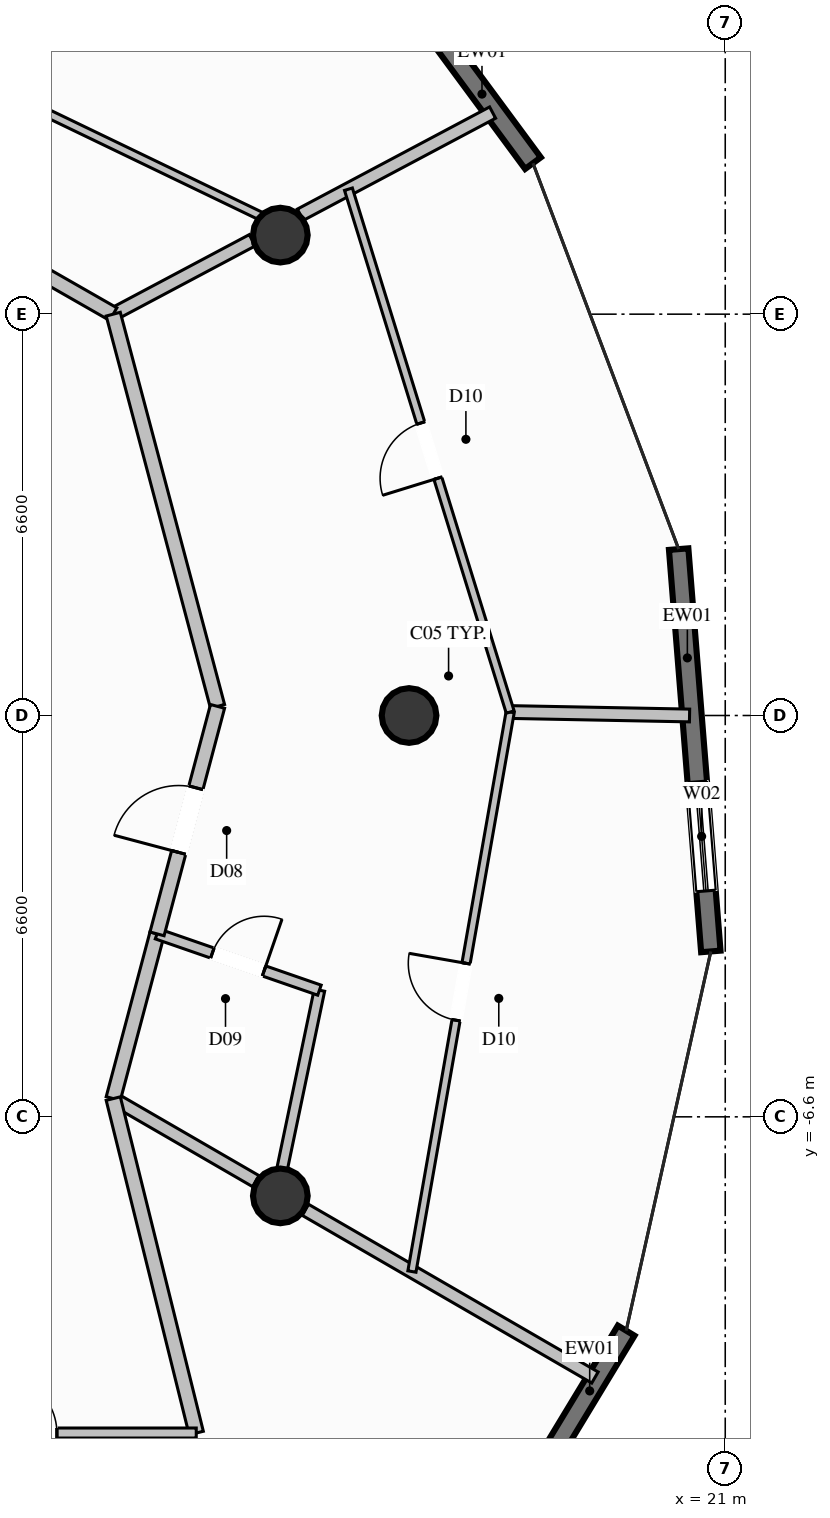
"""IFC4 building model, lengths in metres.
Left out: names, types, materials, properties, quantities, classifications, styles, units other than length and angle.
Written with IfcOpenShell. Run it as: python <this file> out.ifc"""

import sys

from ifc_helpers import new_model, si_unit, direction, frame, frame_2d, origin, origin_2d, place, context, subcontext, project, spatial, rectangle, circle, extrude, element, fill, save


model = new_model("IFC4")
c1 = context("Model", 3, precision=1e-05, world=origin(), true_north=direction((0.0, 1.0)))
c2 = subcontext(c1, "Body", "Model", "MODEL_VIEW")
j1 = project(units=[si_unit("LENGTHUNIT", "METRE"), si_unit("PLANEANGLEUNIT", "RADIAN")], contexts=[c1])
p1 = place(None, origin())
s1 = spatial("IfcSite", under=j1, at=p1, CompositionType="ELEMENT")
p2 = place(p1, origin())
s2 = spatial("IfcBuilding", under=s1, at=p2, CompositionType="ELEMENT")
p3 = place(p2, frame((0.0, 0.0, 194.8)))
s3 = spatial("IfcBuildingStorey", under=s2, at=p3, CompositionType="ELEMENT", Elevation=194.8)
for number, where, z_axis, x_axis in (
    (1, (15.8, 0.0, 0.0), (0.0, 0.0, 1.0), (1.0, 0.0, 0.0)),
    (2, (13.683, 7.9, 0.0), (0.0, 0.0, 1.0), (1.0, 0.0, 0.0)),
    (3, (13.683, -7.9, 0.0), (0.0, 0.0, 1.0), (1.0, 0.0, 0.0)),
):
    element("IfcColumn", number, at=place(p3, frame(where, z_axis=z_axis, x_axis=x_axis)), inside=s3, PredefinedType="COLUMN", context=c2, shape_type="SweptSolid", body=[
        extrude(circle(Radius=0.45, at=origin_2d()), origin(), (0.0, 0.0, 1.0), 3.6),
    ])
p4 = place(p3, frame((19.371, -10.116, 0.0), z_axis=(0.0, 0.0, 1.0), x_axis=(-0.517847159829, -0.855473155077, 0.0)))
e4 = element("IfcWall", 4, at=p4, inside=s3, PredefinedType="SOLIDWALL", context=c2, shape_type="SweptSolid", body=[
    extrude(rectangle(XDim=6.131, YDim=0.32, at=frame_2d((3.066, 0.0))), origin(), (0.0, 0.0, 1.0), 3.36),
])
p5 = place(p4, frame((2.568, 0.0, 0.35)))
e5 = element("IfcOpeningElement", 5, at=p5, cuts=e4, PredefinedType="OPENING", context=c2, shape_type="SweptSolid", body=[
    extrude(rectangle(XDim=1.8, YDim=2.6, at=frame_2d((0.9, 1.3))), frame((0.0, 0.17, 0.0), z_axis=(0.0, -1.0, 0.0), x_axis=(1.0, 0.0, 0.0)), (0.0, 0.0, 1.0), 0.34),
])
p6 = place(p3, frame((20.234, 2.736, 0.0), z_axis=(0.0, 0.0, 1.0), x_axis=(0.079711595883, -0.996817968077, 0.0)))
e6 = element("IfcWall", 6, at=p6, inside=s3, PredefinedType="SOLIDWALL", context=c2, shape_type="SweptSolid", body=[
    extrude(rectangle(XDim=6.637, YDim=0.32, at=frame_2d((3.319, 0.0))), origin(), (0.0, 0.0, 1.0), 3.36),
])
p7 = place(p6, frame((3.839, 0.0, 0.35)))
e7 = element("IfcOpeningElement", 7, at=p7, cuts=e6, PredefinedType="OPENING", context=c2, shape_type="SweptSolid", body=[
    extrude(rectangle(XDim=1.8, YDim=2.6, at=frame_2d((0.9, 1.3))), frame((0.0, 0.17, 0.0), z_axis=(0.0, -1.0, 0.0), x_axis=(1.0, 0.0, 0.0)), (0.0, 0.0, 1.0), 0.34),
])
p8 = place(p3, frame((13.808, 14.542, 0.0), z_axis=(0.0, 0.0, 1.0), x_axis=(0.593903316121, -0.804536419996, 0.0)))
e8 = element("IfcWall", 8, at=p8, inside=s3, PredefinedType="SOLIDWALL", context=c2, shape_type="SweptSolid", body=[
    extrude(rectangle(XDim=6.785, YDim=0.32, at=frame_2d((3.393, 0.0))), origin(), (0.0, 0.0, 1.0), 3.36),
])
p9 = place(p8, frame((1.911, 0.0, 0.35)))
e9 = element("IfcOpeningElement", 9, at=p9, cuts=e8, PredefinedType="OPENING", context=c2, shape_type="SweptSolid", body=[
    extrude(rectangle(XDim=1.8, YDim=2.6, at=frame_2d((0.9, 1.3))), frame((0.0, 0.17, 0.0), z_axis=(0.0, -1.0, 0.0), x_axis=(1.0, 0.0, 0.0)), (0.0, 0.0, 1.0), 0.34),
])
p10 = place(p3, frame((10.935, 6.6, 0.0), z_axis=(0.0, 0.0, 1.0), x_axis=(0.883041221412, 0.469295430711, 0.0)))
e10 = element("IfcWall", 10, at=p10, inside=s3, PredefinedType="PARTITIONING", context=c2, shape_type="SweptSolid", body=[
    extrude(rectangle(XDim=2.589, YDim=0.21, at=frame_2d((1.294, 0.0))), origin(), (0.0, 0.0, 1.0), 2.801),
])
p11 = place(p3, frame((14.012, 8.235, 0.0), z_axis=(0.0, 0.0, 1.0), x_axis=(0.883108656971, 0.469168519813, 0.0)))
e11 = element("IfcWall", 11, at=p11, inside=s3, PredefinedType="PARTITIONING", context=c2, shape_type="SweptSolid", body=[
    extrude(rectangle(XDim=3.581, YDim=0.21, at=frame_2d((1.79, 0.0))), origin(), (0.0, 0.0, 1.0), 3.36),
])
p12 = place(p3, frame((10.935, -6.3, 0.0), z_axis=(0.0, 0.0, 1.0), x_axis=(0.865378990195, -0.50111795351, 0.0)))
e12 = element("IfcWall", 12, at=p12, inside=s3, PredefinedType="PARTITIONING", context=c2, shape_type="SweptSolid", body=[
    extrude(rectangle(XDim=2.71, YDim=0.21, at=frame_2d((1.355, 0.0))), origin(), (0.0, 0.0, 1.0), 2.801),
])
p13 = place(p3, frame((14.094, -8.129, 0.0), z_axis=(0.0, 0.0, 1.0), x_axis=(0.865381739925, -0.501113204979, 0.0)))
e13 = element("IfcWall", 13, at=p13, inside=s3, PredefinedType="PARTITIONING", context=c2, shape_type="SweptSolid", body=[
    extrude(rectangle(XDim=5.504, YDim=0.21, at=frame_2d((2.752, 0.0))), origin(), (0.0, 0.0, 1.0), 3.36),
])
p14 = place(p3, frame((7.35, 8.65, 0.0), z_axis=(0.0, 0.0, 1.0), x_axis=(0.868112139229, -0.496368123193, 0.0)))
e14 = element("IfcWall", 14, at=p14, inside=s3, PredefinedType="PARTITIONING", context=c2, shape_type="SweptSolid", body=[
    extrude(rectangle(XDim=4.13, YDim=0.24, at=frame_2d((2.065, 0.0))), origin(), (0.0, 0.0, 1.0), 3.36),
])
p15 = place(p14, frame((1.515, 0.0, 0.0)))
e15 = element("IfcOpeningElement", 15, at=p15, cuts=e14, PredefinedType="OPENING", context=c2, shape_type="SweptSolid", body=[
    extrude(rectangle(XDim=1.1, YDim=2.3, at=frame_2d((0.55, 1.15))), frame((0.0, 0.13, 0.0), z_axis=(0.0, -1.0, 0.0), x_axis=(1.0, 0.0, 0.0)), (0.0, 0.0, 1.0), 0.26),
])
p16 = place(p3, frame((2.327, 13.528, 0.0), z_axis=(0.0, 0.0, 1.0), x_axis=(0.900917232422, -0.433990944981, 0.0)))
e16 = element("IfcWall", 16, at=p16, inside=s3, PredefinedType="PARTITIONING", context=c2, shape_type="SweptSolid", body=[
    extrude(rectangle(XDim=12.602, YDim=0.135, at=frame_2d((6.301, 0.0))), origin(), (0.0, 0.0, 1.0), 2.929),
])
p17 = place(p16, frame((5.826, 0.0, 0.0)))
e17 = element("IfcOpeningElement", 17, at=p17, cuts=e16, PredefinedType="OPENING", context=c2, shape_type="SweptSolid", body=[
    extrude(rectangle(XDim=0.95, YDim=2.1, at=frame_2d((0.475, 1.05))), frame((0.0, 0.078, 0.0), z_axis=(0.0, -1.0, 0.0), x_axis=(1.0, 0.0, 0.0)), (0.0, 0.0, 1.0), 0.155),
])
p18 = place(p3, frame((10.935, -6.3, 0.0), z_axis=(0.0, 0.0, 1.0), x_axis=(0.25685481711, 0.966450000221, 0.0)))
e18 = element("IfcWall", 18, at=p18, inside=s3, PredefinedType="PARTITIONING", context=c2, shape_type="SweptSolid", body=[
    extrude(rectangle(XDim=2.803, YDim=0.24, at=frame_2d((1.401, 0.0))), origin(), (0.0, 0.0, 1.0), 3.36),
])
p19 = place(p3, frame((13.628, -7.86, 0.0), z_axis=(0.0, 0.0, 1.0), x_axis=(0.20438530576, 0.978890518285, 0.0)))
e19 = element("IfcWall", 19, at=p19, inside=s3, PredefinedType="PLUMBINGWALL", context=c2, shape_type="SweptSolid", body=[
    extrude(rectangle(XDim=3.415, YDim=0.175, at=frame_2d((1.708, 0.0))), origin(), (0.0, 0.0, 1.0), 2.929),
])
p20 = place(p3, frame((11.655, -3.591, 0.0), z_axis=(0.0, 0.0, 1.0), x_axis=(0.944823724973, -0.327579194591, 0.0)))
e20 = element("IfcWall", 20, at=p20, inside=s3, PredefinedType="PLUMBINGWALL", context=c2, shape_type="SweptSolid", body=[
    extrude(rectangle(XDim=2.827, YDim=0.175, at=frame_2d((1.414, 0.0))), origin(), (0.0, 0.0, 1.0), 3.36),
])
p21 = place(p20, frame((0.963, 0.0, 0.0)))
e21 = element("IfcOpeningElement", 21, at=p21, cuts=e20, PredefinedType="OPENING", context=c2, shape_type="SweptSolid", body=[
    extrude(rectangle(XDim=0.9, YDim=2.1, at=frame_2d((0.45, 1.05))), frame((0.0, 0.098, 0.0), z_axis=(0.0, -1.0, 0.0), x_axis=(1.0, 0.0, 0.0)), (0.0, 0.0, 1.0), 0.195),
])
p22 = place(p3, frame((17.463, 0.057, 0.0), z_axis=(0.0, 0.0, 1.0), x_axis=(0.99981415994, -0.019278111492, 0.0)))
e22 = element("IfcWall", 22, at=p22, inside=s3, PredefinedType="PARTITIONING", context=c2, shape_type="SweptSolid", body=[
    extrude(rectangle(XDim=2.951, YDim=0.21, at=frame_2d((1.475, 0.0))), origin(), (0.0, 0.0, 1.0), 3.36),
])
p23 = place(p3, frame((12.65, 0.15, 0.0), z_axis=(0.0, 0.0, 1.0), x_axis=(-0.256934024047, 0.966428945804, 0.0)))
e23 = element("IfcWall", 23, at=p23, inside=s3, PredefinedType="PARTITIONING", context=c2, shape_type="SweptSolid", body=[
    extrude(rectangle(XDim=6.674, YDim=0.24, at=frame_2d((3.337, 0.0))), origin(), (0.0, 0.0, 1.0), 3.36),
])
p24 = place(p3, frame((11.655, -3.591, 0.0), z_axis=(0.0, 0.0, 1.0), x_axis=(0.257007037833, 0.966409531464, 0.0)))
e24 = element("IfcWall", 24, at=p24, inside=s3, PredefinedType="PARTITIONING", context=c2, shape_type="SweptSolid", body=[
    extrude(rectangle(XDim=3.871, YDim=0.24, at=frame_2d((1.936, 0.0))), origin(), (0.0, 0.0, 1.0), 3.36),
])
p25 = place(p24, frame((1.386, 0.0, 0.0)))
e25 = element("IfcOpeningElement", 25, at=p25, cuts=e24, PredefinedType="OPENING", context=c2, shape_type="SweptSolid", body=[
    extrude(rectangle(XDim=1.1, YDim=2.3, at=frame_2d((0.55, 1.15))), frame((0.0, 0.13, 0.0), z_axis=(0.0, -1.0, 0.0), x_axis=(1.0, 0.0, 0.0)), (0.0, 0.0, 1.0), 0.26),
])
p26 = place(p3, frame((15.847, -9.144, 0.0), z_axis=(0.0, 0.0, 1.0), x_axis=(0.17298318012, 0.984924778547, 0.0)))
e26 = element("IfcWall", 26, at=p26, inside=s3, PredefinedType="PARTITIONING", context=c2, shape_type="SweptSolid", body=[
    extrude(rectangle(XDim=9.342, YDim=0.135, at=frame_2d((4.671, 0.0))), origin(), (0.0, 0.0, 1.0), 3.36),
])
p27 = place(p26, frame((4.196, 0.0, 0.0)))
e27 = element("IfcOpeningElement", 27, at=p27, cuts=e26, PredefinedType="OPENING", context=c2, shape_type="SweptSolid", body=[
    extrude(rectangle(XDim=0.95, YDim=2.1, at=frame_2d((0.475, 1.05))), frame((0.0, 0.078, 0.0), z_axis=(0.0, -1.0, 0.0), x_axis=(1.0, 0.0, 0.0)), (0.0, 0.0, 1.0), 0.155),
])
p28 = place(p3, frame((17.463, 0.057, 0.0), z_axis=(0.0, 0.0, 1.0), x_axis=(-0.295539912375, 0.955330393211, 0.0)))
e28 = element("IfcWall", 28, at=p28, inside=s3, PredefinedType="PARTITIONING", context=c2, shape_type="SweptSolid", body=[
    extrude(rectangle(XDim=9.0, YDim=0.135, at=frame_2d((4.5, 0.0))), origin(), (0.0, 0.0, 1.0), 3.36),
])
p29 = place(p28, frame((4.025, 0.0, 0.0)))
e29 = element("IfcOpeningElement", 29, at=p29, cuts=e28, PredefinedType="OPENING", context=c2, shape_type="SweptSolid", body=[
    extrude(rectangle(XDim=0.95, YDim=2.1, at=frame_2d((0.475, 1.05))), frame((0.0, 0.078, 0.0), z_axis=(0.0, -1.0, 0.0), x_axis=(1.0, 0.0, 0.0)), (0.0, 0.0, 1.0), 0.155),
])
p30 = place(p3, frame((12.3, -11.8, 0.0), z_axis=(0.0, 0.0, 1.0), x_axis=(-0.240872801332, 0.970556692614, 0.0)))
e30 = element("IfcWall", 30, at=p30, inside=s3, PredefinedType="PARTITIONING", context=c2, shape_type="SweptSolid", body=[
    extrude(rectangle(XDim=5.667, YDim=0.24, at=frame_2d((2.833, 0.0))), origin(), (0.0, 0.0, 1.0), 3.36),
])
p31 = place(p3, frame((6.765, -11.8, 0.0), z_axis=(0.0, 0.0, 1.0), x_axis=(1.0, 0.0, 0.0)))
e31 = element("IfcWall", 31, at=p31, inside=s3, PredefinedType="PARTITIONING", context=c2, shape_type="SweptSolid", body=[
    extrude(rectangle(XDim=5.535, YDim=0.165, at=frame_2d((2.768, 0.0))), origin(), (0.0, 0.0, 1.0), 3.36),
])
p32 = place(p31, frame((2.293, 0.0, 0.0)))
e32 = element("IfcOpeningElement", 32, at=p32, cuts=e31, PredefinedType="OPENING", context=c2, shape_type="SweptSolid", body=[
    extrude(rectangle(XDim=0.95, YDim=2.1, at=frame_2d((0.475, 1.05))), frame((0.0, 0.093, 0.0), z_axis=(0.0, -1.0, 0.0), x_axis=(1.0, 0.0, 0.0)), (0.0, 0.0, 1.0), 0.185),
])
p33 = place(p7, origin())
e33 = element("IfcWindow", 33, at=p33, inside=s3, PartitioningType="SINGLE_PANEL", PredefinedType="WINDOW", context=c2, shape_type="SweptSolid", body=[
    extrude(rectangle(XDim=1.8, YDim=2.6, at=frame_2d((0.9, 1.3))), frame((0.0, 0.03, 0.0), z_axis=(0.0, -1.0, 0.0), x_axis=(1.0, 0.0, 0.0)), (0.0, 0.0, 1.0), 0.06),
])
fill(e7, e33)
p34 = place(p21, origin())
e34 = element("IfcDoor", 34, at=p34, inside=s3, OperationType="SINGLE_SWING_RIGHT", PredefinedType="DOOR", context=c2, shape_type="SweptSolid", body=[
    extrude(rectangle(XDim=0.9, YDim=2.1, at=frame_2d((0.45, 1.05))), frame((0.0, 0.025, 0.0), z_axis=(0.0, -1.0, 0.0), x_axis=(1.0, 0.0, 0.0)), (0.0, 0.0, 1.0), 0.05),
])
fill(e21, e34)
p35 = place(p25, origin())
e35 = element("IfcDoor", 35, at=p35, inside=s3, OperationType="SINGLE_SWING_LEFT", PredefinedType="DOOR", context=c2, shape_type="SweptSolid", body=[
    extrude(rectangle(XDim=1.1, YDim=2.3, at=frame_2d((0.55, 1.15))), frame((0.0, 0.025, 0.0), z_axis=(0.0, -1.0, 0.0), x_axis=(1.0, 0.0, 0.0)), (0.0, 0.0, 1.0), 0.05),
])
fill(e25, e35)
p36 = place(p27, origin())
e36 = element("IfcDoor", 36, at=p36, inside=s3, OperationType="SINGLE_SWING_RIGHT", PredefinedType="DOOR", context=c2, shape_type="SweptSolid", body=[
    extrude(rectangle(XDim=0.95, YDim=2.1, at=frame_2d((0.475, 1.05))), frame((0.0, 0.025, 0.0), z_axis=(0.0, -1.0, 0.0), x_axis=(1.0, 0.0, 0.0)), (0.0, 0.0, 1.0), 0.05),
])
fill(e27, e36)
p37 = place(p29, origin())
e37 = element("IfcDoor", 37, at=p37, inside=s3, OperationType="SINGLE_SWING_LEFT", PredefinedType="DOOR", context=c2, shape_type="SweptSolid", body=[
    extrude(rectangle(XDim=0.95, YDim=2.1, at=frame_2d((0.475, 1.05))), frame((0.0, 0.025, 0.0), z_axis=(0.0, -1.0, 0.0), x_axis=(1.0, 0.0, 0.0)), (0.0, 0.0, 1.0), 0.05),
])
fill(e29, e37)
p38 = place(p32, origin())
e38 = element("IfcDoor", 38, at=p38, inside=s3, OperationType="SINGLE_SWING_LEFT", PredefinedType="DOOR", context=c2, shape_type="SweptSolid", body=[
    extrude(rectangle(XDim=0.95, YDim=2.1, at=frame_2d((0.475, 1.05))), frame((0.0, 0.025, 0.0), z_axis=(0.0, -1.0, 0.0), x_axis=(1.0, 0.0, 0.0)), (0.0, 0.0, 1.0), 0.05),
])
fill(e32, e38)
save(model, sys.argv[1])
